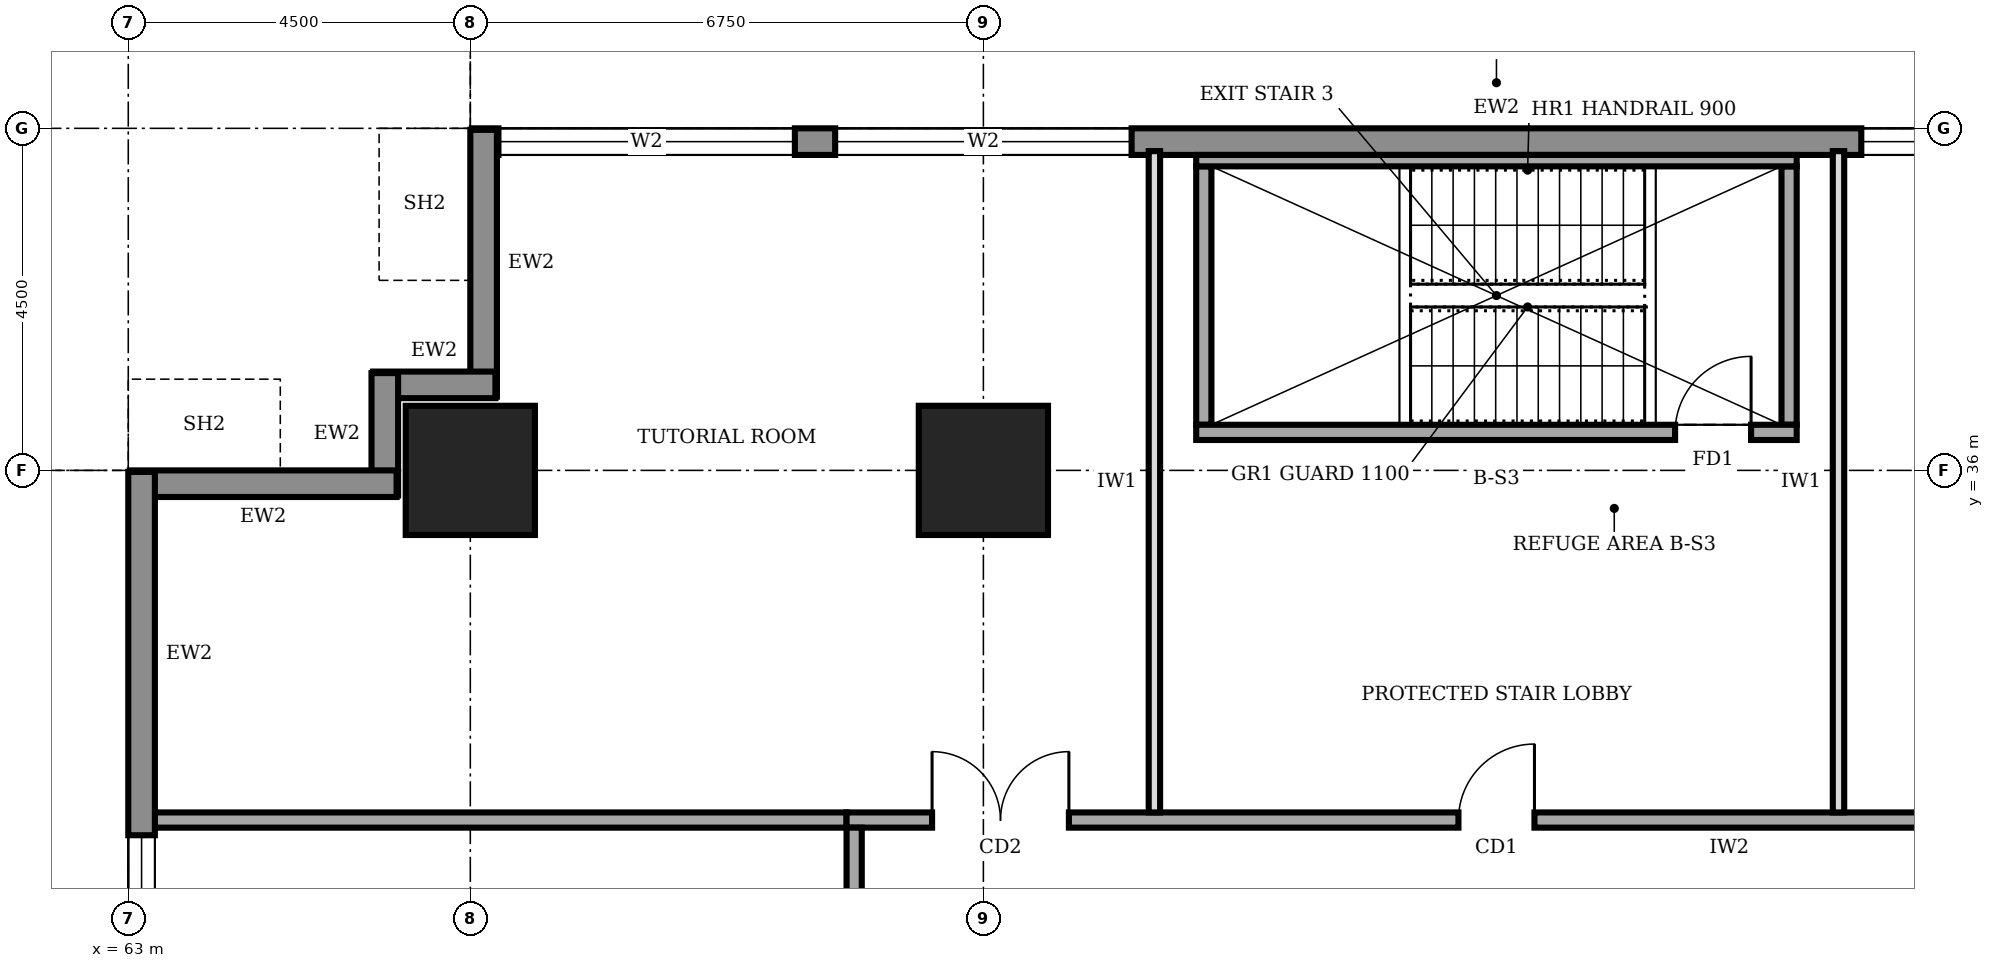
"""IFC4 building model, lengths in metres.
Left out: names, types, materials, properties, quantities, classifications, styles, units other than length and angle.
Written with IfcOpenShell. Run it as: python <this file> out.ifc"""

import sys

from ifc_helpers import new_model, si_unit, direction, frame, frame_2d, origin, origin_2d, place, context, subcontext, project, spatial, rectangle, extrude, element, fill, save


model = new_model("IFC4")
c1 = context("Model", 3, precision=1e-05, world=origin(), true_north=direction((0.0, 1.0)))
c2 = subcontext(c1, "Body", "Model", "MODEL_VIEW")
j1 = project(units=[si_unit("LENGTHUNIT", "METRE"), si_unit("PLANEANGLEUNIT", "RADIAN")], contexts=[c1])
p1 = place(None, origin())
s1 = spatial("IfcSite", under=j1, at=p1, CompositionType="ELEMENT")
p2 = place(p1, origin())
s2 = spatial("IfcBuilding", under=s1, at=p2, CompositionType="ELEMENT")
p3 = place(p2, frame((0.0, 0.0, 73.0)))
s3 = spatial("IfcBuildingStorey", under=s2, at=p3, CompositionType="ELEMENT", Elevation=73.0)
for number, where, z_axis, x_axis in (
    (1, (67.5, 36.0, 0.0), (0.0, 0.0, 1.0), (1.0, 0.0, 0.0)),
    (2, (74.25, 36.0, 0.0), (0.0, 0.0, 1.0), (1.0, 0.0, 0.0)),
):
    element("IfcColumn", number, at=place(p3, frame(where, z_axis=z_axis, x_axis=x_axis)), inside=s3, PredefinedType="COLUMN", context=c2, shape_type="SweptSolid", body=[
        extrude(rectangle(XDim=1.7, YDim=1.7, at=origin_2d()), origin(), (0.0, 0.0, 1.0), 4.0),
    ])
p4 = place(p3, frame((94.48, 40.325, 0.0), z_axis=(0.0, 0.0, 1.0), x_axis=(-1.0, 0.0, 0.0)))
e3 = element("IfcWall", 3, at=p4, inside=s3, PredefinedType="STANDARD", context=c2, shape_type="SweptSolid", body=[
    extrude(rectangle(XDim=26.96, YDim=0.35, at=frame_2d((13.48, 0.0))), origin(), (0.0, 0.0, 1.0), 3.75),
])
p5 = place(p4, frame((22.71, 0.0, 0.6)))
e4 = element("IfcOpeningElement", 4, at=p5, cuts=e3, PredefinedType="OPENING", context=c2, shape_type="SweptSolid", body=[
    extrude(rectangle(XDim=3.9, YDim=2.6, at=frame_2d((1.95, 1.3))), frame((0.0, 0.185, 0.0), z_axis=(0.0, -1.0, 0.0), x_axis=(1.0, 0.0, 0.0)), (0.0, 0.0, 1.0), 0.37),
])
p6 = place(p4, frame((18.28, 0.0, 0.6)))
e5 = element("IfcOpeningElement", 5, at=p6, cuts=e3, PredefinedType="OPENING", context=c2, shape_type="SweptSolid", body=[
    extrude(rectangle(XDim=3.9, YDim=2.6, at=frame_2d((1.95, 1.3))), frame((0.0, 0.185, 0.0), z_axis=(0.0, -1.0, 0.0), x_axis=(1.0, 0.0, 0.0)), (0.0, 0.0, 1.0), 0.37),
])
p7 = place(p4, frame((4.78, 0.0, 0.6)))
e6 = element("IfcOpeningElement", 6, at=p7, cuts=e3, PredefinedType="OPENING", context=c2, shape_type="SweptSolid", body=[
    extrude(rectangle(XDim=3.9, YDim=2.6, at=frame_2d((1.95, 1.3))), frame((0.0, 0.185, 0.0), z_axis=(0.0, -1.0, 0.0), x_axis=(1.0, 0.0, 0.0)), (0.0, 0.0, 1.0), 0.37),
])
p8 = place(p3, frame((67.675, 40.48, 0.0), z_axis=(0.0, 0.0, 1.0), x_axis=(0.0, -1.0, 0.0)))
e7 = element("IfcWall", 7, at=p8, inside=s3, PredefinedType="STANDARD", context=c2, shape_type="SweptSolid", body=[
    extrude(rectangle(XDim=3.51, YDim=0.35, at=frame_2d((1.755, 0.0))), origin(), (0.0, 0.0, 1.0), 2.75),
])
for number, where, z_axis, x_axis in (
    (8, (67.83, 37.125, 0.0), (0.0, 0.0, 1.0), (-1.0, 0.0, 0.0)),
    (9, (66.375, 37.28, 0.0), (0.0, 0.0, 1.0), (0.0, -1.0, 0.0)),
):
    element("IfcWall", number, at=place(p3, frame(where, z_axis=z_axis, x_axis=x_axis)), inside=s3, PredefinedType="STANDARD", context=c2, shape_type="SweptSolid", body=[
        extrude(rectangle(XDim=1.61, YDim=0.35, at=frame_2d((0.805, 0.0))), origin(), (0.0, 0.0, 1.0), 3.75),
    ])
p9 = place(p3, frame((66.53, 35.825, 0.0), z_axis=(0.0, 0.0, 1.0), x_axis=(-1.0, 0.0, 0.0)))
e10 = element("IfcWall", 10, at=p9, inside=s3, PredefinedType="STANDARD", context=c2, shape_type="SweptSolid", body=[
    extrude(rectangle(XDim=3.51, YDim=0.35, at=frame_2d((1.755, 0.0))), origin(), (0.0, 0.0, 1.0), 2.75),
])
p10 = place(p3, frame((63.175, 35.98, 0.0), z_axis=(0.0, 0.0, 1.0), x_axis=(0.0, -1.0, 0.0)))
e11 = element("IfcWall", 11, at=p10, inside=s3, PredefinedType="STANDARD", context=c2, shape_type="SweptSolid", body=[
    extrude(rectangle(XDim=31.46, YDim=0.35, at=frame_2d((15.73, 0.0))), origin(), (0.0, 0.0, 1.0), 3.75),
])
p11 = place(p10, frame((27.21, 0.0, 0.6)))
e12 = element("IfcOpeningElement", 12, at=p11, cuts=e11, PredefinedType="OPENING", context=c2, shape_type="SweptSolid", body=[
    extrude(rectangle(XDim=3.9, YDim=2.6, at=frame_2d((1.95, 1.3))), frame((0.0, 0.185, 0.0), z_axis=(0.0, -1.0, 0.0), x_axis=(1.0, 0.0, 0.0)), (0.0, 0.0, 1.0), 0.37),
])
p12 = place(p10, frame((22.78, 0.0, 0.6)))
e13 = element("IfcOpeningElement", 13, at=p12, cuts=e11, PredefinedType="OPENING", context=c2, shape_type="SweptSolid", body=[
    extrude(rectangle(XDim=3.9, YDim=2.6, at=frame_2d((1.95, 1.3))), frame((0.0, 0.185, 0.0), z_axis=(0.0, -1.0, 0.0), x_axis=(1.0, 0.0, 0.0)), (0.0, 0.0, 1.0), 0.37),
])
p13 = place(p10, frame((18.28, 0.0, 0.6)))
e14 = element("IfcOpeningElement", 14, at=p13, cuts=e11, PredefinedType="OPENING", context=c2, shape_type="SweptSolid", body=[
    extrude(rectangle(XDim=3.9, YDim=2.6, at=frame_2d((1.95, 1.3))), frame((0.0, 0.185, 0.0), z_axis=(0.0, -1.0, 0.0), x_axis=(1.0, 0.0, 0.0)), (0.0, 0.0, 1.0), 0.37),
])
p14 = place(p10, frame((13.78, 0.0, 0.6)))
e15 = element("IfcOpeningElement", 15, at=p14, cuts=e11, PredefinedType="OPENING", context=c2, shape_type="SweptSolid", body=[
    extrude(rectangle(XDim=3.9, YDim=2.6, at=frame_2d((1.95, 1.3))), frame((0.0, 0.185, 0.0), z_axis=(0.0, -1.0, 0.0), x_axis=(1.0, 0.0, 0.0)), (0.0, 0.0, 1.0), 0.37),
])
p15 = place(p10, frame((9.28, 0.0, 0.6)))
e16 = element("IfcOpeningElement", 16, at=p15, cuts=e11, PredefinedType="OPENING", context=c2, shape_type="SweptSolid", body=[
    extrude(rectangle(XDim=3.9, YDim=2.6, at=frame_2d((1.95, 1.3))), frame((0.0, 0.185, 0.0), z_axis=(0.0, -1.0, 0.0), x_axis=(1.0, 0.0, 0.0)), (0.0, 0.0, 1.0), 0.37),
])
p16 = place(p10, frame((4.78, 0.0, 0.6)))
e17 = element("IfcOpeningElement", 17, at=p16, cuts=e11, PredefinedType="OPENING", context=c2, shape_type="SweptSolid", body=[
    extrude(rectangle(XDim=3.9, YDim=2.6, at=frame_2d((1.95, 1.3))), frame((0.0, 0.185, 0.0), z_axis=(0.0, -1.0, 0.0), x_axis=(1.0, 0.0, 0.0)), (0.0, 0.0, 1.0), 0.37),
])
p17 = place(p3, frame((89.35, 31.4, 0.0), z_axis=(0.0, 0.0, 1.0), x_axis=(-1.0, 0.0, 0.0)))
e18 = element("IfcWall", 18, at=p17, inside=s3, PredefinedType="SOLIDWALL", context=c2, shape_type="SweptSolid", body=[
    extrude(rectangle(XDim=16.9, YDim=0.2, at=frame_2d((8.45, 0.0))), origin(), (0.0, 0.0, 1.0), 3.75),
])
p18 = place(p17, frame((13.975, 0.0, 0.0)))
e19 = element("IfcOpeningElement", 19, at=p18, cuts=e18, PredefinedType="OPENING", context=c2, shape_type="SweptSolid", body=[
    extrude(rectangle(XDim=1.8, YDim=2.1, at=frame_2d((0.9, 1.05))), frame((0.0, 0.11, 0.0), z_axis=(0.0, -1.0, 0.0), x_axis=(1.0, 0.0, 0.0)), (0.0, 0.0, 1.0), 0.22),
])
p19 = place(p17, frame((7.85, 0.0, 0.0)))
e20 = element("IfcOpeningElement", 20, at=p19, cuts=e18, PredefinedType="OPENING", context=c2, shape_type="SweptSolid", body=[
    extrude(rectangle(XDim=1.0, YDim=2.1, at=frame_2d((0.5, 1.05))), frame((0.0, 0.11, 0.0), z_axis=(0.0, -1.0, 0.0), x_axis=(1.0, 0.0, 0.0)), (0.0, 0.0, 1.0), 0.22),
])
p20 = place(p17, frame((0.925, 0.0, 0.0)))
e21 = element("IfcOpeningElement", 21, at=p20, cuts=e18, PredefinedType="OPENING", context=c2, shape_type="SweptSolid", body=[
    extrude(rectangle(XDim=1.8, YDim=2.1, at=frame_2d((0.9, 1.05))), frame((0.0, 0.11, 0.0), z_axis=(0.0, -1.0, 0.0), x_axis=(1.0, 0.0, 0.0)), (0.0, 0.0, 1.0), 0.22),
])
p21 = place(p3, frame((72.55, 31.3, 0.0), z_axis=(0.0, 0.0, 1.0), x_axis=(0.0, -1.0, 0.0)))
e22 = element("IfcWall", 22, at=p21, inside=s3, PredefinedType="SOLIDWALL", context=c2, shape_type="SweptSolid", body=[
    extrude(rectangle(XDim=22.3, YDim=0.2, at=frame_2d((11.15, 0.0))), origin(), (0.0, 0.0, 1.0), 3.75),
])
p22 = place(p21, frame((19.55, 0.0, 0.0)))
e23 = element("IfcOpeningElement", 23, at=p22, cuts=e22, PredefinedType="OPENING", context=c2, shape_type="SweptSolid", body=[
    extrude(rectangle(XDim=1.0, YDim=2.1, at=frame_2d((0.5, 1.05))), frame((0.0, 0.11, 0.0), z_axis=(0.0, -1.0, 0.0), x_axis=(1.0, 0.0, 0.0)), (0.0, 0.0, 1.0), 0.22),
])
p23 = place(p21, frame((12.8, 0.0, 0.0)))
e24 = element("IfcOpeningElement", 24, at=p23, cuts=e22, PredefinedType="OPENING", context=c2, shape_type="SweptSolid", body=[
    extrude(rectangle(XDim=1.0, YDim=2.1, at=frame_2d((0.5, 1.05))), frame((0.0, 0.11, 0.0), z_axis=(0.0, -1.0, 0.0), x_axis=(1.0, 0.0, 0.0)), (0.0, 0.0, 1.0), 0.22),
])
p24 = place(p21, frame((6.05, 0.0, 0.0)))
e25 = element("IfcOpeningElement", 25, at=p24, cuts=e22, PredefinedType="OPENING", context=c2, shape_type="SweptSolid", body=[
    extrude(rectangle(XDim=1.0, YDim=2.1, at=frame_2d((0.5, 1.05))), frame((0.0, 0.11, 0.0), z_axis=(0.0, -1.0, 0.0), x_axis=(1.0, 0.0, 0.0)), (0.0, 0.0, 1.0), 0.22),
])
p25 = place(p21, frame((1.55, 0.0, 0.0)))
e26 = element("IfcOpeningElement", 26, at=p25, cuts=e22, PredefinedType="OPENING", context=c2, shape_type="SweptSolid", body=[
    extrude(rectangle(XDim=1.0, YDim=2.1, at=frame_2d((0.5, 1.05))), frame((0.0, 0.11, 0.0), z_axis=(0.0, -1.0, 0.0), x_axis=(1.0, 0.0, 0.0)), (0.0, 0.0, 1.0), 0.22),
])
p26 = place(p3, frame((63.3, 31.4, 0.0), z_axis=(0.0, 0.0, 1.0), x_axis=(1.0, 0.0, 0.0)))
e27 = element("IfcWall", 27, at=p26, inside=s3, PredefinedType="SOLIDWALL", context=c2, shape_type="SweptSolid", body=[
    extrude(rectangle(XDim=9.15, YDim=0.2, at=frame_2d((4.575, 0.0))), origin(), (0.0, 0.0, 1.0), 3.75),
])
for number, where, z_axis, x_axis in (
    (28, (76.5, 31.5, 0.0), (0.0, 0.0, 1.0), (0.0, 1.0, 0.0)),
    (29, (85.5, 31.5, 0.0), (0.0, 0.0, 1.0), (0.0, 1.0, 0.0)),
):
    element("IfcWall", number, at=place(p3, frame(where, z_axis=z_axis, x_axis=x_axis)), inside=s3, PredefinedType="PARTITIONING", context=c2, shape_type="SweptSolid", body=[
        extrude(rectangle(XDim=8.7, YDim=0.15, at=frame_2d((4.35, 0.0))), origin(), (0.0, 0.0, 1.0), 3.75),
    ])
p27 = place(p3, frame((77.05, 36.5, 0.0), z_axis=(0.0, 0.0, 1.0), x_axis=(1.0, 0.0, 0.0)))
e30 = element("IfcWall", 30, at=p27, inside=s3, PredefinedType="SOLIDWALL", context=c2, shape_type="SweptSolid", body=[
    extrude(rectangle(XDim=7.9, YDim=0.2, at=frame_2d((3.95, 0.0))), origin(), (0.0, 0.0, 1.0), 3.75),
])
p28 = place(p27, frame((6.3, 0.0, 0.0)))
e31 = element("IfcOpeningElement", 31, at=p28, cuts=e30, PredefinedType="OPENING", context=c2, shape_type="SweptSolid", body=[
    extrude(rectangle(XDim=1.0, YDim=2.1, at=frame_2d((0.5, 1.05))), frame((0.0, 0.11, 0.0), z_axis=(0.0, -1.0, 0.0), x_axis=(1.0, 0.0, 0.0)), (0.0, 0.0, 1.0), 0.22),
])
p29 = place(p3, frame((77.05, 40.075, 0.0), z_axis=(0.0, 0.0, 1.0), x_axis=(1.0, 0.0, 0.0)))
e32 = element("IfcWall", 32, at=p29, inside=s3, PredefinedType="SOLIDWALL", context=c2, shape_type="SweptSolid", body=[
    extrude(rectangle(XDim=7.9, YDim=0.15, at=frame_2d((3.95, 0.0))), origin(), (0.0, 0.0, 1.0), 3.75),
])
for number, where, z_axis, x_axis in (
    (33, (77.15, 36.6, 0.0), (0.0, 0.0, 1.0), (0.0, 1.0, 0.0)),
    (34, (84.85, 36.6, 0.0), (0.0, 0.0, 1.0), (0.0, 1.0, 0.0)),
):
    element("IfcWall", number, at=place(p3, frame(where, z_axis=z_axis, x_axis=x_axis)), inside=s3, PredefinedType="SOLIDWALL", context=c2, shape_type="SweptSolid", body=[
        extrude(rectangle(XDim=3.4, YDim=0.2, at=frame_2d((1.7, 0.0))), origin(), (0.0, 0.0, 1.0), 3.75),
    ])
p30 = place(p5, origin())
e35 = element("IfcWindow", 35, at=p30, inside=s3, PartitioningType="SINGLE_PANEL", PredefinedType="WINDOW", context=c2, shape_type="SweptSolid", body=[
    extrude(rectangle(XDim=3.9, YDim=2.6, at=frame_2d((1.95, 1.3))), frame((0.0, 0.03, 0.0), z_axis=(0.0, -1.0, 0.0), x_axis=(1.0, 0.0, 0.0)), (0.0, 0.0, 1.0), 0.06),
])
fill(e4, e35)
p31 = place(p6, origin())
e36 = element("IfcWindow", 36, at=p31, inside=s3, PartitioningType="SINGLE_PANEL", PredefinedType="WINDOW", context=c2, shape_type="SweptSolid", body=[
    extrude(rectangle(XDim=3.9, YDim=2.6, at=frame_2d((1.95, 1.3))), frame((0.0, 0.03, 0.0), z_axis=(0.0, -1.0, 0.0), x_axis=(1.0, 0.0, 0.0)), (0.0, 0.0, 1.0), 0.06),
])
fill(e5, e36)
p32 = place(p7, origin())
e37 = element("IfcWindow", 37, at=p32, inside=s3, PartitioningType="SINGLE_PANEL", PredefinedType="WINDOW", context=c2, shape_type="SweptSolid", body=[
    extrude(rectangle(XDim=3.9, YDim=2.6, at=frame_2d((1.95, 1.3))), frame((0.0, 0.03, 0.0), z_axis=(0.0, -1.0, 0.0), x_axis=(1.0, 0.0, 0.0)), (0.0, 0.0, 1.0), 0.06),
])
fill(e6, e37)
p33 = place(p16, origin())
e38 = element("IfcWindow", 38, at=p33, inside=s3, PartitioningType="SINGLE_PANEL", PredefinedType="WINDOW", context=c2, shape_type="SweptSolid", body=[
    extrude(rectangle(XDim=3.9, YDim=2.6, at=frame_2d((1.95, 1.3))), frame((0.0, 0.03, 0.0), z_axis=(0.0, -1.0, 0.0), x_axis=(1.0, 0.0, 0.0)), (0.0, 0.0, 1.0), 0.06),
])
fill(e17, e38)
p34 = place(p18, frame((1.8, 0.0, 0.0), z_axis=(0.0, 0.0, 1.0), x_axis=(-1.0, 0.0, 0.0)))
e39 = element("IfcDoor", 39, at=p34, inside=s3, OperationType="DOUBLE_DOOR_SINGLE_SWING", PredefinedType="DOOR", context=c2, shape_type="SweptSolid", body=[
    extrude(rectangle(XDim=1.8, YDim=2.1, at=frame_2d((0.9, 1.05))), frame((0.0, 0.025, 0.0), z_axis=(0.0, -1.0, 0.0), x_axis=(1.0, 0.0, 0.0)), (0.0, 0.0, 1.0), 0.05),
])
fill(e19, e39)
p35 = place(p19, frame((1.0, 0.0, 0.0), z_axis=(0.0, 0.0, 1.0), x_axis=(-1.0, 0.0, 0.0)))
e40 = element("IfcDoor", 40, at=p35, inside=s3, OperationType="SINGLE_SWING_RIGHT", PredefinedType="DOOR", context=c2, shape_type="SweptSolid", body=[
    extrude(rectangle(XDim=1.0, YDim=2.1, at=frame_2d((0.5, 1.05))), frame((0.0, 0.025, 0.0), z_axis=(0.0, -1.0, 0.0), x_axis=(1.0, 0.0, 0.0)), (0.0, 0.0, 1.0), 0.05),
])
fill(e20, e40)
p36 = place(p28, origin())
e41 = element("IfcDoor", 41, at=p36, inside=s3, OperationType="SINGLE_SWING_RIGHT", PredefinedType="DOOR", context=c2, shape_type="SweptSolid", body=[
    extrude(rectangle(XDim=1.0, YDim=2.1, at=frame_2d((0.5, 1.05))), frame((0.0, 0.025, 0.0), z_axis=(0.0, -1.0, 0.0), x_axis=(1.0, 0.0, 0.0)), (0.0, 0.0, 1.0), 0.05),
])
fill(e31, e41)
save(model, sys.argv[1])
